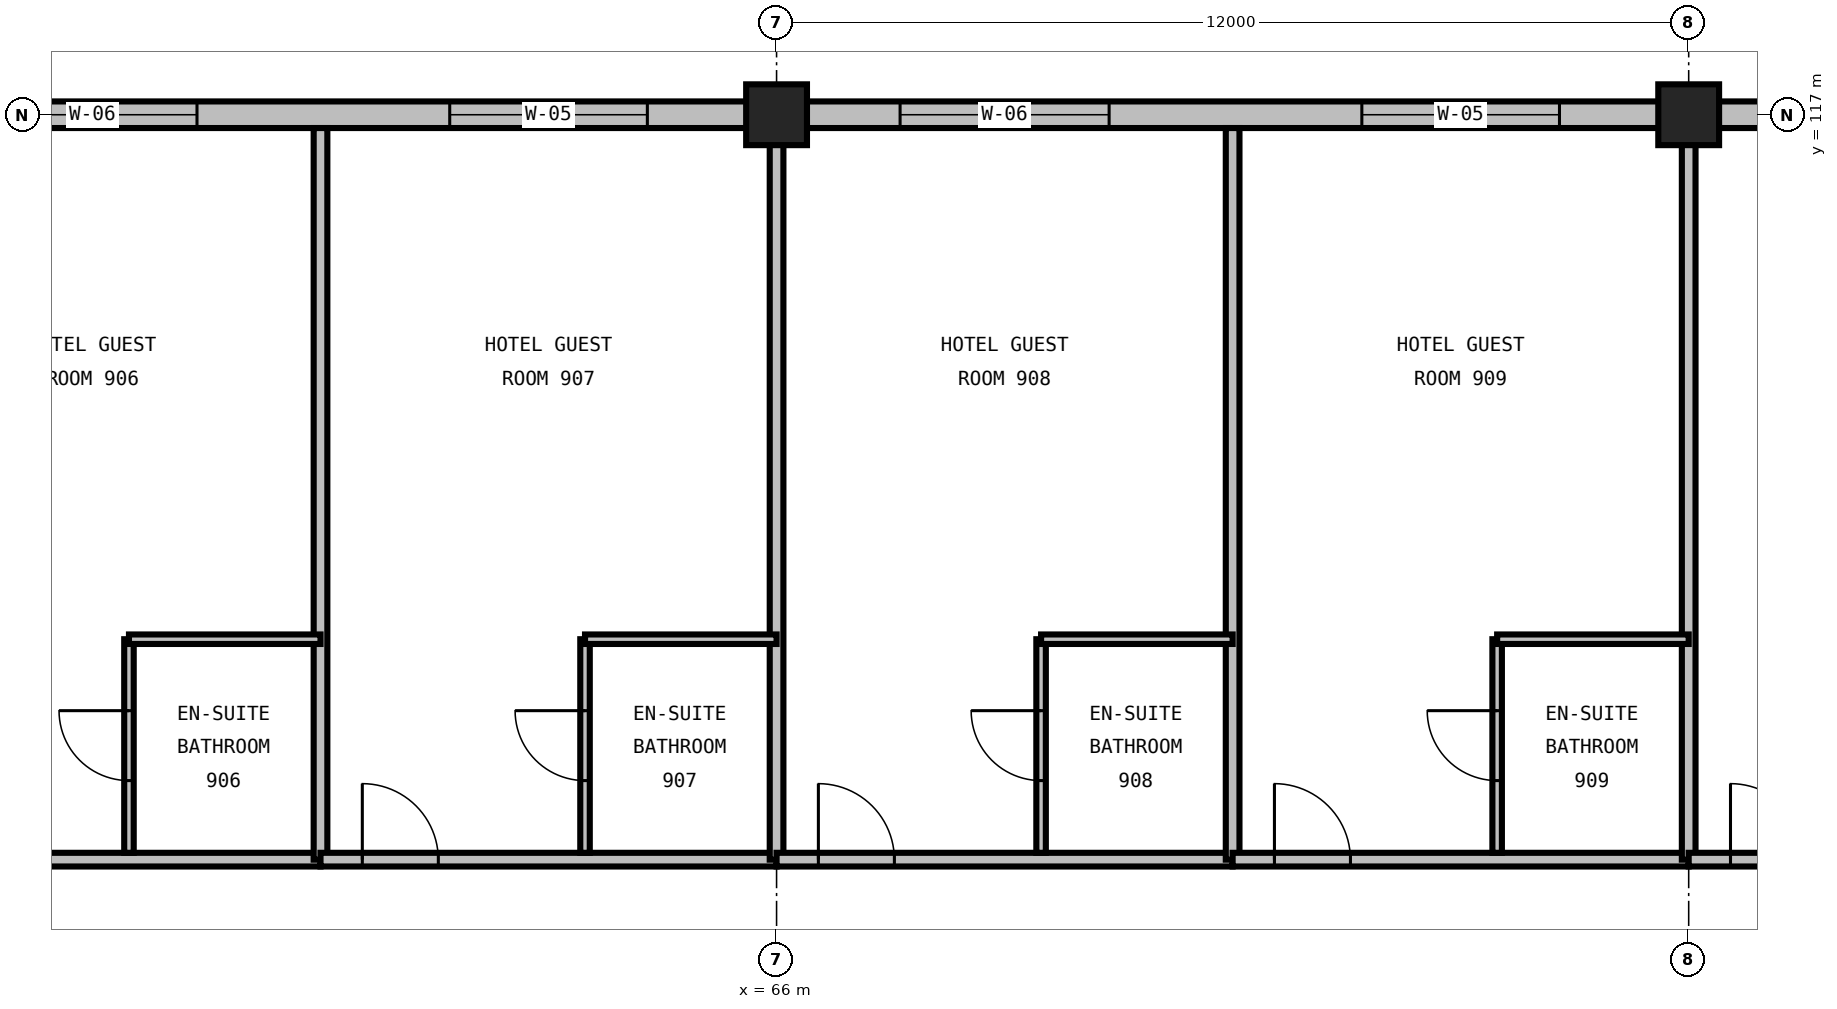
"""IFC4 building model, lengths in metres.
Left out: names, types, materials, properties, quantities, classifications, styles, units other than length and angle.
Written with IfcOpenShell. Run it as: python <this file> out.ifc"""

import sys

from ifc_helpers import new_model, si_unit, direction, frame, frame_2d, origin, origin_2d, place, context, subcontext, project, spatial, rectangle, extrude, element, fill, save


model = new_model("IFC4")
c1 = context("Model", 3, precision=1e-05, world=origin(), true_north=direction((0.0, 1.0)))
c2 = subcontext(c1, "Body", "Model", "MODEL_VIEW")
j1 = project(units=[si_unit("LENGTHUNIT", "METRE"), si_unit("PLANEANGLEUNIT", "RADIAN")], contexts=[c1])
p1 = place(None, origin())
s1 = spatial("IfcSite", under=j1, at=p1, CompositionType="ELEMENT")
p2 = place(p1, origin())
s2 = spatial("IfcBuilding", under=s1, at=p2, CompositionType="ELEMENT")
p3 = place(p2, frame((0.0, 0.0, 42.0)))
s3 = spatial("IfcBuildingStorey", under=s2, at=p3, CompositionType="ELEMENT", Elevation=42.0)
for number, where, z_axis, x_axis in (
    (1, (66.0, 117.0, 0.0), (0.0, 0.0, 1.0), (1.0, 0.0, 0.0)),
    (2, (78.0, 117.0, 0.0), (0.0, 0.0, 1.0), (1.0, 0.0, 0.0)),
):
    element("IfcColumn", number, at=place(p3, frame(where, z_axis=z_axis, x_axis=x_axis)), inside=s3, PredefinedType="COLUMN", context=c2, shape_type="SweptSolid", body=[
        extrude(rectangle(XDim=0.8, YDim=0.8, at=origin_2d()), origin(), (0.0, 0.0, 1.0), 3.6),
    ])
p4 = place(p3, frame((66.0, 117.0, 0.0), z_axis=(0.0, 0.0, 1.0), x_axis=(-1.0, 0.0, 0.0)))
e3 = element("IfcWall", 3, at=p4, inside=s3, PredefinedType="STANDARD", context=c2, shape_type="SweptSolid", body=[
    extrude(rectangle(XDim=12.0, YDim=0.35, at=frame_2d((6.0, 0.0))), origin(), (0.0, 0.0, 1.0), 2.486),
])
p5 = place(p4, frame((1.7, 0.0, 0.72)))
e4 = element("IfcOpeningElement", 4, at=p5, cuts=e3, PredefinedType="OPENING", context=c2, shape_type="SweptSolid", body=[
    extrude(rectangle(XDim=2.6, YDim=1.69, at=frame_2d((1.3, 0.845))), frame((0.0, 0.19, 0.0), z_axis=(0.0, -1.0, 0.0), x_axis=(1.0, 0.0, 0.0)), (0.0, 0.0, 1.0), 0.38),
])
p6 = place(p4, frame((7.625, 0.0, 0.72)))
e5 = element("IfcOpeningElement", 5, at=p6, cuts=e3, PredefinedType="OPENING", context=c2, shape_type="SweptSolid", body=[
    extrude(rectangle(XDim=2.75, YDim=1.69, at=frame_2d((1.375, 0.845))), frame((0.0, 0.19, 0.0), z_axis=(0.0, -1.0, 0.0), x_axis=(1.0, 0.0, 0.0)), (0.0, 0.0, 1.0), 0.38),
])
p7 = place(p3, frame((78.0, 117.0, 0.0), z_axis=(0.0, 0.0, 1.0), x_axis=(-1.0, 0.0, 0.0)))
e6 = element("IfcWall", 6, at=p7, inside=s3, PredefinedType="STANDARD", context=c2, shape_type="SweptSolid", body=[
    extrude(rectangle(XDim=12.0, YDim=0.35, at=frame_2d((6.0, 0.0))), origin(), (0.0, 0.0, 1.0), 2.486),
])
p8 = place(p7, frame((1.7, 0.0, 0.72)))
e7 = element("IfcOpeningElement", 7, at=p8, cuts=e6, PredefinedType="OPENING", context=c2, shape_type="SweptSolid", body=[
    extrude(rectangle(XDim=2.6, YDim=1.69, at=frame_2d((1.3, 0.845))), frame((0.0, 0.19, 0.0), z_axis=(0.0, -1.0, 0.0), x_axis=(1.0, 0.0, 0.0)), (0.0, 0.0, 1.0), 0.38),
])
p9 = place(p7, frame((7.625, 0.0, 0.72)))
e8 = element("IfcOpeningElement", 8, at=p9, cuts=e6, PredefinedType="OPENING", context=c2, shape_type="SweptSolid", body=[
    extrude(rectangle(XDim=2.75, YDim=1.69, at=frame_2d((1.375, 0.845))), frame((0.0, 0.19, 0.0), z_axis=(0.0, -1.0, 0.0), x_axis=(1.0, 0.0, 0.0)), (0.0, 0.0, 1.0), 0.38),
])
p10 = place(p3, frame((84.0, 117.0, 0.0), z_axis=(0.0, 0.0, 1.0), x_axis=(-1.0, 0.0, 0.0)))
e9 = element("IfcWall", 9, at=p10, inside=s3, PredefinedType="STANDARD", context=c2, shape_type="SweptSolid", body=[
    extrude(rectangle(XDim=6.0, YDim=0.35, at=frame_2d((3.0, 0.0))), origin(), (0.0, 0.0, 1.0), 2.486),
])
p11 = place(p10, frame((1.7, 0.0, 0.72)))
e10 = element("IfcOpeningElement", 10, at=p11, cuts=e9, PredefinedType="OPENING", context=c2, shape_type="SweptSolid", body=[
    extrude(rectangle(XDim=2.6, YDim=1.69, at=frame_2d((1.3, 0.845))), frame((0.0, 0.19, 0.0), z_axis=(0.0, -1.0, 0.0), x_axis=(1.0, 0.0, 0.0)), (0.0, 0.0, 1.0), 0.38),
])
p12 = place(p3, frame((54.0, 107.2, 0.0), z_axis=(0.0, 0.0, 1.0), x_axis=(1.0, 0.0, 0.0)))
e11 = element("IfcWall", 11, at=p12, inside=s3, PredefinedType="PARTITIONING", context=c2, shape_type="SweptSolid", body=[
    extrude(rectangle(XDim=6.0, YDim=0.18, at=frame_2d((3.0, 0.0))), origin(), (0.0, 0.0, 1.0), 3.29),
])
p13 = place(p12, frame((0.55, 0.0, 0.0)))
e12 = element("IfcOpeningElement", 12, at=p13, cuts=e11, PredefinedType="OPENING", context=c2, shape_type="SweptSolid", body=[
    extrude(rectangle(XDim=1.0, YDim=2.15, at=frame_2d((0.5, 1.075))), frame((0.0, 0.105, 0.0), z_axis=(0.0, -1.0, 0.0), x_axis=(1.0, 0.0, 0.0)), (0.0, 0.0, 1.0), 0.21),
])
p14 = place(p3, frame((60.0, 107.2, 0.0), z_axis=(0.0, 0.0, 1.0), x_axis=(0.0, 1.0, 0.0)))
e13 = element("IfcWall", 13, at=p14, inside=s3, PredefinedType="PARTITIONING", context=c2, shape_type="SweptSolid", body=[
    extrude(rectangle(XDim=9.625, YDim=0.18, at=frame_2d((4.812, 0.0))), origin(), (0.0, 0.0, 1.0), 3.29),
])
p15 = place(p3, frame((57.48, 107.29, 0.0), z_axis=(0.0, 0.0, 1.0), x_axis=(0.0, 1.0, 0.0)))
e14 = element("IfcWall", 14, at=p15, inside=s3, PredefinedType="PARTITIONING", context=c2, shape_type="SweptSolid", body=[
    extrude(rectangle(XDim=2.81, YDim=0.125, at=frame_2d((1.405, 0.0))), origin(), (0.0, 0.0, 1.0), 3.29),
])
p16 = place(p15, frame((0.95, 0.0, 0.0)))
e15 = element("IfcOpeningElement", 15, at=p16, cuts=e14, PredefinedType="OPENING", context=c2, shape_type="SweptSolid", body=[
    extrude(rectangle(XDim=0.92, YDim=2.1, at=frame_2d((0.46, 1.05))), frame((0.0, 0.077, 0.0), z_axis=(0.0, -1.0, 0.0), x_axis=(1.0, 0.0, 0.0)), (0.0, 0.0, 1.0), 0.155),
])
p17 = place(p3, frame((57.48, 110.1, 0.0), z_axis=(0.0, 0.0, 1.0), x_axis=(1.0, 0.0, 0.0)))
e16 = element("IfcWall", 16, at=p17, inside=s3, PredefinedType="PARTITIONING", context=c2, shape_type="SweptSolid", body=[
    extrude(rectangle(XDim=2.52, YDim=0.125, at=frame_2d((1.26, 0.0))), origin(), (0.0, 0.0, 1.0), 3.29),
])
p18 = place(p3, frame((60.0, 107.2, 0.0), z_axis=(0.0, 0.0, 1.0), x_axis=(1.0, 0.0, 0.0)))
e17 = element("IfcWall", 17, at=p18, inside=s3, PredefinedType="PARTITIONING", context=c2, shape_type="SweptSolid", body=[
    extrude(rectangle(XDim=6.0, YDim=0.18, at=frame_2d((3.0, 0.0))), origin(), (0.0, 0.0, 1.0), 3.29),
])
p19 = place(p18, frame((0.55, 0.0, 0.0)))
e18 = element("IfcOpeningElement", 18, at=p19, cuts=e17, PredefinedType="OPENING", context=c2, shape_type="SweptSolid", body=[
    extrude(rectangle(XDim=1.0, YDim=2.15, at=frame_2d((0.5, 1.075))), frame((0.0, 0.105, 0.0), z_axis=(0.0, -1.0, 0.0), x_axis=(1.0, 0.0, 0.0)), (0.0, 0.0, 1.0), 0.21),
])
p20 = place(p3, frame((66.0, 107.2, 0.0), z_axis=(0.0, 0.0, 1.0), x_axis=(0.0, 1.0, 0.0)))
e19 = element("IfcWall", 19, at=p20, inside=s3, PredefinedType="PARTITIONING", context=c2, shape_type="SweptSolid", body=[
    extrude(rectangle(XDim=9.625, YDim=0.18, at=frame_2d((4.812, 0.0))), origin(), (0.0, 0.0, 1.0), 2.59),
])
p21 = place(p3, frame((63.48, 107.29, 0.0), z_axis=(0.0, 0.0, 1.0), x_axis=(0.0, 1.0, 0.0)))
e20 = element("IfcWall", 20, at=p21, inside=s3, PredefinedType="PARTITIONING", context=c2, shape_type="SweptSolid", body=[
    extrude(rectangle(XDim=2.81, YDim=0.125, at=frame_2d((1.405, 0.0))), origin(), (0.0, 0.0, 1.0), 3.29),
])
p22 = place(p21, frame((0.95, 0.0, 0.0)))
e21 = element("IfcOpeningElement", 21, at=p22, cuts=e20, PredefinedType="OPENING", context=c2, shape_type="SweptSolid", body=[
    extrude(rectangle(XDim=0.92, YDim=2.1, at=frame_2d((0.46, 1.05))), frame((0.0, 0.077, 0.0), z_axis=(0.0, -1.0, 0.0), x_axis=(1.0, 0.0, 0.0)), (0.0, 0.0, 1.0), 0.155),
])
p23 = place(p3, frame((63.48, 110.1, 0.0), z_axis=(0.0, 0.0, 1.0), x_axis=(1.0, 0.0, 0.0)))
e22 = element("IfcWall", 22, at=p23, inside=s3, PredefinedType="PARTITIONING", context=c2, shape_type="SweptSolid", body=[
    extrude(rectangle(XDim=2.52, YDim=0.125, at=frame_2d((1.26, 0.0))), origin(), (0.0, 0.0, 1.0), 3.29),
])
p24 = place(p3, frame((66.0, 107.2, 0.0), z_axis=(0.0, 0.0, 1.0), x_axis=(1.0, 0.0, 0.0)))
e23 = element("IfcWall", 23, at=p24, inside=s3, PredefinedType="PARTITIONING", context=c2, shape_type="SweptSolid", body=[
    extrude(rectangle(XDim=6.0, YDim=0.18, at=frame_2d((3.0, 0.0))), origin(), (0.0, 0.0, 1.0), 3.29),
])
p25 = place(p24, frame((0.55, 0.0, 0.0)))
e24 = element("IfcOpeningElement", 24, at=p25, cuts=e23, PredefinedType="OPENING", context=c2, shape_type="SweptSolid", body=[
    extrude(rectangle(XDim=1.0, YDim=2.15, at=frame_2d((0.5, 1.075))), frame((0.0, 0.105, 0.0), z_axis=(0.0, -1.0, 0.0), x_axis=(1.0, 0.0, 0.0)), (0.0, 0.0, 1.0), 0.21),
])
p26 = place(p3, frame((72.0, 107.2, 0.0), z_axis=(0.0, 0.0, 1.0), x_axis=(0.0, 1.0, 0.0)))
e25 = element("IfcWall", 25, at=p26, inside=s3, PredefinedType="PARTITIONING", context=c2, shape_type="SweptSolid", body=[
    extrude(rectangle(XDim=9.625, YDim=0.18, at=frame_2d((4.812, 0.0))), origin(), (0.0, 0.0, 1.0), 3.29),
])
p27 = place(p3, frame((69.48, 107.29, 0.0), z_axis=(0.0, 0.0, 1.0), x_axis=(0.0, 1.0, 0.0)))
e26 = element("IfcWall", 26, at=p27, inside=s3, PredefinedType="PARTITIONING", context=c2, shape_type="SweptSolid", body=[
    extrude(rectangle(XDim=2.81, YDim=0.125, at=frame_2d((1.405, 0.0))), origin(), (0.0, 0.0, 1.0), 3.29),
])
p28 = place(p27, frame((0.95, 0.0, 0.0)))
e27 = element("IfcOpeningElement", 27, at=p28, cuts=e26, PredefinedType="OPENING", context=c2, shape_type="SweptSolid", body=[
    extrude(rectangle(XDim=0.92, YDim=2.1, at=frame_2d((0.46, 1.05))), frame((0.0, 0.077, 0.0), z_axis=(0.0, -1.0, 0.0), x_axis=(1.0, 0.0, 0.0)), (0.0, 0.0, 1.0), 0.155),
])
p29 = place(p3, frame((69.48, 110.1, 0.0), z_axis=(0.0, 0.0, 1.0), x_axis=(1.0, 0.0, 0.0)))
e28 = element("IfcWall", 28, at=p29, inside=s3, PredefinedType="PARTITIONING", context=c2, shape_type="SweptSolid", body=[
    extrude(rectangle(XDim=2.52, YDim=0.125, at=frame_2d((1.26, 0.0))), origin(), (0.0, 0.0, 1.0), 3.29),
])
p30 = place(p3, frame((72.0, 107.2, 0.0), z_axis=(0.0, 0.0, 1.0), x_axis=(1.0, 0.0, 0.0)))
e29 = element("IfcWall", 29, at=p30, inside=s3, PredefinedType="PARTITIONING", context=c2, shape_type="SweptSolid", body=[
    extrude(rectangle(XDim=6.0, YDim=0.18, at=frame_2d((3.0, 0.0))), origin(), (0.0, 0.0, 1.0), 3.29),
])
p31 = place(p30, frame((0.55, 0.0, 0.0)))
e30 = element("IfcOpeningElement", 30, at=p31, cuts=e29, PredefinedType="OPENING", context=c2, shape_type="SweptSolid", body=[
    extrude(rectangle(XDim=1.0, YDim=2.15, at=frame_2d((0.5, 1.075))), frame((0.0, 0.105, 0.0), z_axis=(0.0, -1.0, 0.0), x_axis=(1.0, 0.0, 0.0)), (0.0, 0.0, 1.0), 0.21),
])
p32 = place(p3, frame((78.0, 107.2, 0.0), z_axis=(0.0, 0.0, 1.0), x_axis=(0.0, 1.0, 0.0)))
e31 = element("IfcWall", 31, at=p32, inside=s3, PredefinedType="PARTITIONING", context=c2, shape_type="SweptSolid", body=[
    extrude(rectangle(XDim=9.625, YDim=0.18, at=frame_2d((4.812, 0.0))), origin(), (0.0, 0.0, 1.0), 2.59),
])
p33 = place(p3, frame((75.48, 107.29, 0.0), z_axis=(0.0, 0.0, 1.0), x_axis=(0.0, 1.0, 0.0)))
e32 = element("IfcWall", 32, at=p33, inside=s3, PredefinedType="PARTITIONING", context=c2, shape_type="SweptSolid", body=[
    extrude(rectangle(XDim=2.81, YDim=0.125, at=frame_2d((1.405, 0.0))), origin(), (0.0, 0.0, 1.0), 3.29),
])
p34 = place(p33, frame((0.95, 0.0, 0.0)))
e33 = element("IfcOpeningElement", 33, at=p34, cuts=e32, PredefinedType="OPENING", context=c2, shape_type="SweptSolid", body=[
    extrude(rectangle(XDim=0.92, YDim=2.1, at=frame_2d((0.46, 1.05))), frame((0.0, 0.077, 0.0), z_axis=(0.0, -1.0, 0.0), x_axis=(1.0, 0.0, 0.0)), (0.0, 0.0, 1.0), 0.155),
])
p35 = place(p3, frame((75.48, 110.1, 0.0), z_axis=(0.0, 0.0, 1.0), x_axis=(1.0, 0.0, 0.0)))
e34 = element("IfcWall", 34, at=p35, inside=s3, PredefinedType="PARTITIONING", context=c2, shape_type="SweptSolid", body=[
    extrude(rectangle(XDim=2.52, YDim=0.125, at=frame_2d((1.26, 0.0))), origin(), (0.0, 0.0, 1.0), 3.29),
])
p36 = place(p3, frame((78.0, 107.2, 0.0), z_axis=(0.0, 0.0, 1.0), x_axis=(1.0, 0.0, 0.0)))
e35 = element("IfcWall", 35, at=p36, inside=s3, PredefinedType="PARTITIONING", context=c2, shape_type="SweptSolid", body=[
    extrude(rectangle(XDim=5.915, YDim=0.18, at=frame_2d((2.957, 0.0))), origin(), (0.0, 0.0, 1.0), 3.29),
])
p37 = place(p36, frame((0.55, 0.0, 0.0)))
e36 = element("IfcOpeningElement", 36, at=p37, cuts=e35, PredefinedType="OPENING", context=c2, shape_type="SweptSolid", body=[
    extrude(rectangle(XDim=1.0, YDim=2.15, at=frame_2d((0.5, 1.075))), frame((0.0, 0.105, 0.0), z_axis=(0.0, -1.0, 0.0), x_axis=(1.0, 0.0, 0.0)), (0.0, 0.0, 1.0), 0.21),
])
p38 = place(p5, origin())
e37 = element("IfcWindow", 37, at=p38, inside=s3, PartitioningType="DOUBLE_PANEL_VERTICAL", PredefinedType="WINDOW", context=c2, shape_type="SweptSolid", body=[
    extrude(rectangle(XDim=2.6, YDim=1.69, at=frame_2d((1.3, 0.845))), frame((0.0, 0.03, 0.0), z_axis=(0.0, -1.0, 0.0), x_axis=(1.0, 0.0, 0.0)), (0.0, 0.0, 1.0), 0.06),
])
fill(e4, e37)
p39 = place(p6, origin())
e38 = element("IfcWindow", 38, at=p39, inside=s3, PartitioningType="TRIPLE_PANEL_VERTICAL", PredefinedType="WINDOW", context=c2, shape_type="SweptSolid", body=[
    extrude(rectangle(XDim=2.75, YDim=1.69, at=frame_2d((1.375, 0.845))), frame((0.0, 0.03, 0.0), z_axis=(0.0, -1.0, 0.0), x_axis=(1.0, 0.0, 0.0)), (0.0, 0.0, 1.0), 0.06),
])
fill(e5, e38)
p40 = place(p8, origin())
e39 = element("IfcWindow", 39, at=p40, inside=s3, PartitioningType="DOUBLE_PANEL_VERTICAL", PredefinedType="WINDOW", context=c2, shape_type="SweptSolid", body=[
    extrude(rectangle(XDim=2.6, YDim=1.69, at=frame_2d((1.3, 0.845))), frame((0.0, 0.03, 0.0), z_axis=(0.0, -1.0, 0.0), x_axis=(1.0, 0.0, 0.0)), (0.0, 0.0, 1.0), 0.06),
])
fill(e7, e39)
p41 = place(p9, origin())
e40 = element("IfcWindow", 40, at=p41, inside=s3, PartitioningType="TRIPLE_PANEL_VERTICAL", PredefinedType="WINDOW", context=c2, shape_type="SweptSolid", body=[
    extrude(rectangle(XDim=2.75, YDim=1.69, at=frame_2d((1.375, 0.845))), frame((0.0, 0.03, 0.0), z_axis=(0.0, -1.0, 0.0), x_axis=(1.0, 0.0, 0.0)), (0.0, 0.0, 1.0), 0.06),
])
fill(e8, e40)
p42 = place(p16, origin())
e41 = element("IfcDoor", 41, at=p42, inside=s3, OperationType="SINGLE_SWING_RIGHT", PredefinedType="DOOR", context=c2, shape_type="SweptSolid", body=[
    extrude(rectangle(XDim=0.92, YDim=2.1, at=frame_2d((0.46, 1.05))), frame((0.0, 0.025, 0.0), z_axis=(0.0, -1.0, 0.0), x_axis=(1.0, 0.0, 0.0)), (0.0, 0.0, 1.0), 0.05),
])
fill(e15, e41)
p43 = place(p19, origin())
e42 = element("IfcDoor", 42, at=p43, inside=s3, OperationType="SINGLE_SWING_LEFT", PredefinedType="DOOR", context=c2, shape_type="SweptSolid", body=[
    extrude(rectangle(XDim=1.0, YDim=2.15, at=frame_2d((0.5, 1.075))), frame((0.0, 0.025, 0.0), z_axis=(0.0, -1.0, 0.0), x_axis=(1.0, 0.0, 0.0)), (0.0, 0.0, 1.0), 0.05),
])
fill(e18, e42)
p44 = place(p22, origin())
e43 = element("IfcDoor", 43, at=p44, inside=s3, OperationType="SINGLE_SWING_RIGHT", PredefinedType="DOOR", context=c2, shape_type="SweptSolid", body=[
    extrude(rectangle(XDim=0.92, YDim=2.1, at=frame_2d((0.46, 1.05))), frame((0.0, 0.025, 0.0), z_axis=(0.0, -1.0, 0.0), x_axis=(1.0, 0.0, 0.0)), (0.0, 0.0, 1.0), 0.05),
])
fill(e21, e43)
p45 = place(p25, origin())
e44 = element("IfcDoor", 44, at=p45, inside=s3, OperationType="SINGLE_SWING_LEFT", PredefinedType="DOOR", context=c2, shape_type="SweptSolid", body=[
    extrude(rectangle(XDim=1.0, YDim=2.15, at=frame_2d((0.5, 1.075))), frame((0.0, 0.025, 0.0), z_axis=(0.0, -1.0, 0.0), x_axis=(1.0, 0.0, 0.0)), (0.0, 0.0, 1.0), 0.05),
])
fill(e24, e44)
p46 = place(p28, origin())
e45 = element("IfcDoor", 45, at=p46, inside=s3, OperationType="SINGLE_SWING_RIGHT", PredefinedType="DOOR", context=c2, shape_type="SweptSolid", body=[
    extrude(rectangle(XDim=0.92, YDim=2.1, at=frame_2d((0.46, 1.05))), frame((0.0, 0.025, 0.0), z_axis=(0.0, -1.0, 0.0), x_axis=(1.0, 0.0, 0.0)), (0.0, 0.0, 1.0), 0.05),
])
fill(e27, e45)
p47 = place(p31, origin())
e46 = element("IfcDoor", 46, at=p47, inside=s3, OperationType="SINGLE_SWING_LEFT", PredefinedType="DOOR", context=c2, shape_type="SweptSolid", body=[
    extrude(rectangle(XDim=1.0, YDim=2.15, at=frame_2d((0.5, 1.075))), frame((0.0, 0.025, 0.0), z_axis=(0.0, -1.0, 0.0), x_axis=(1.0, 0.0, 0.0)), (0.0, 0.0, 1.0), 0.05),
])
fill(e30, e46)
p48 = place(p34, origin())
e47 = element("IfcDoor", 47, at=p48, inside=s3, OperationType="SINGLE_SWING_RIGHT", PredefinedType="DOOR", context=c2, shape_type="SweptSolid", body=[
    extrude(rectangle(XDim=0.92, YDim=2.1, at=frame_2d((0.46, 1.05))), frame((0.0, 0.025, 0.0), z_axis=(0.0, -1.0, 0.0), x_axis=(1.0, 0.0, 0.0)), (0.0, 0.0, 1.0), 0.05),
])
fill(e33, e47)
p49 = place(p37, origin())
e48 = element("IfcDoor", 48, at=p49, inside=s3, OperationType="SINGLE_SWING_LEFT", PredefinedType="DOOR", context=c2, shape_type="SweptSolid", body=[
    extrude(rectangle(XDim=1.0, YDim=2.15, at=frame_2d((0.5, 1.075))), frame((0.0, 0.025, 0.0), z_axis=(0.0, -1.0, 0.0), x_axis=(1.0, 0.0, 0.0)), (0.0, 0.0, 1.0), 0.05),
])
fill(e36, e48)
save(model, sys.argv[1])
